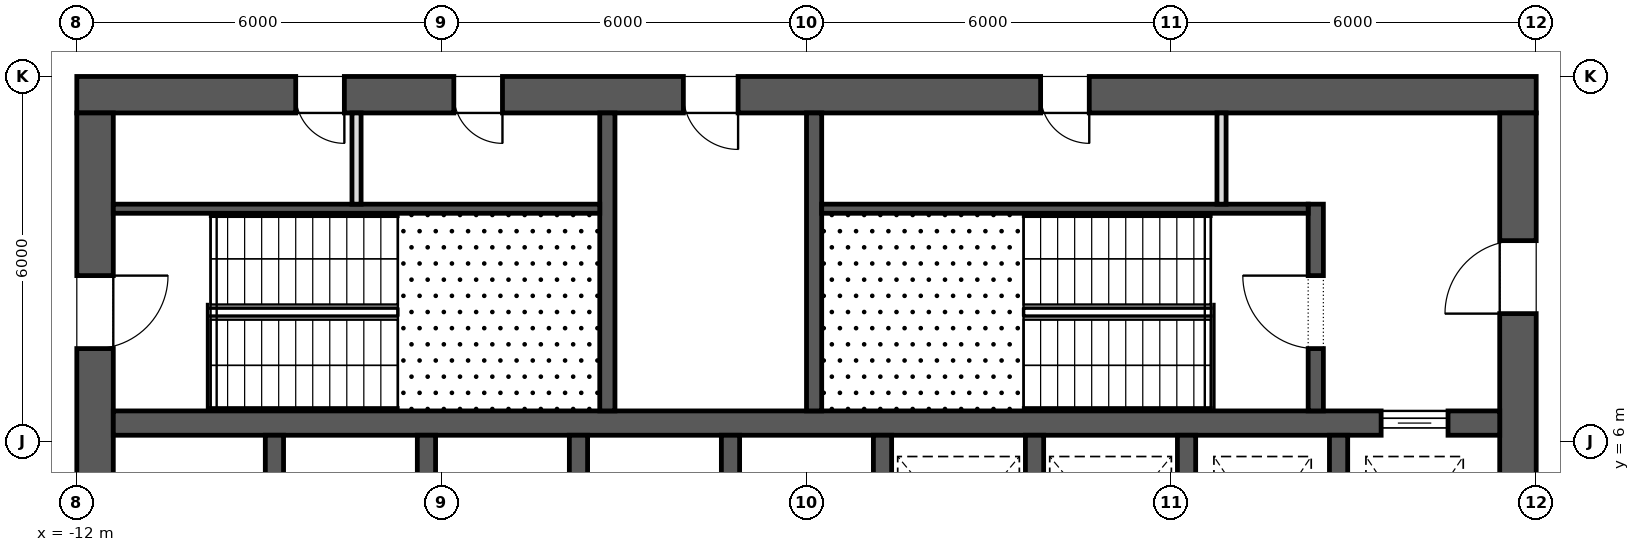
"""IFC4 building model, lengths in metres.
Left out: names, types, materials, properties, quantities, classifications, styles, units other than length and angle.
Written with IfcOpenShell. Run it as: python <this file> out.ifc"""

import sys

from ifc_helpers import new_model, si_unit, direction, frame, frame_2d, origin, place, context, subcontext, project, spatial, rectangle, extrude, element, fill, save


model = new_model("IFC4")
c1 = context("Model", 3, precision=1e-05, world=origin(), true_north=direction((0.0, 1.0)))
c2 = subcontext(c1, "Body", "Model", "MODEL_VIEW")
j1 = project(units=[si_unit("LENGTHUNIT", "METRE"), si_unit("PLANEANGLEUNIT", "RADIAN")], contexts=[c1])
p1 = place(None, origin())
s1 = spatial("IfcSite", under=j1, at=p1, CompositionType="ELEMENT")
p2 = place(p1, origin())
s2 = spatial("IfcBuilding", under=s1, at=p2, CompositionType="ELEMENT")
p3 = place(p2, frame((0.0, 0.0, 138.1)))
s3 = spatial("IfcBuildingStorey", under=s2, at=p3, CompositionType="ELEMENT", Elevation=138.1)
p4 = place(p3, frame((-12.0, 11.7, 0.0), z_axis=(0.0, 0.0, 1.0), x_axis=(1.0, 0.0, 0.0)))
e1 = element("IfcWall", 1, at=p4, inside=s3, PredefinedType="SHEAR", context=c2, shape_type="SweptSolid", body=[
    extrude(rectangle(XDim=24.0, YDim=0.6, at=frame_2d((12.0, 0.0))), origin(), (0.0, 0.0, 1.0), 4.2),
])
p5 = place(p4, frame((9.975, 0.0, 0.0)))
e2 = element("IfcOpeningElement", 2, at=p5, cuts=e1, PredefinedType="OPENING", context=c2, shape_type="SweptSolid", body=[
    extrude(rectangle(XDim=0.9, YDim=2.1, at=frame_2d((0.45, 1.05))), frame((0.0, 0.312, 0.0), z_axis=(0.0, -1.0, 0.0), x_axis=(1.0, 0.0, 0.0)), (0.0, 0.0, 1.0), 0.624),
])
p6 = place(p4, frame((3.6, 0.0, 0.0)))
e3 = element("IfcOpeningElement", 3, at=p6, cuts=e1, PredefinedType="OPENING", context=c2, shape_type="SweptSolid", body=[
    extrude(rectangle(XDim=0.8, YDim=2.1, at=frame_2d((0.4, 1.05))), frame((0.0, 0.312, 0.0), z_axis=(0.0, -1.0, 0.0), x_axis=(1.0, 0.0, 0.0)), (0.0, 0.0, 1.0), 0.624),
])
p7 = place(p4, frame((6.2, 0.0, 0.0)))
e4 = element("IfcOpeningElement", 4, at=p7, cuts=e1, PredefinedType="OPENING", context=c2, shape_type="SweptSolid", body=[
    extrude(rectangle(XDim=0.8, YDim=2.1, at=frame_2d((0.4, 1.05))), frame((0.0, 0.312, 0.0), z_axis=(0.0, -1.0, 0.0), x_axis=(1.0, 0.0, 0.0)), (0.0, 0.0, 1.0), 0.624),
])
p8 = place(p4, frame((15.85, 0.0, 0.0)))
e5 = element("IfcOpeningElement", 5, at=p8, cuts=e1, PredefinedType="OPENING", context=c2, shape_type="SweptSolid", body=[
    extrude(rectangle(XDim=0.8, YDim=2.1, at=frame_2d((0.4, 1.05))), frame((0.0, 0.312, 0.0), z_axis=(0.0, -1.0, 0.0), x_axis=(1.0, 0.0, 0.0)), (0.0, 0.0, 1.0), 0.624),
])
p9 = place(p3, frame((11.7, -11.4, 0.0), z_axis=(0.0, 0.0, 1.0), x_axis=(0.0, 1.0, 0.0)))
e6 = element("IfcWall", 6, at=p9, inside=s3, PredefinedType="SHEAR", context=c2, shape_type="SweptSolid", body=[
    extrude(rectangle(XDim=22.8, YDim=0.6, at=frame_2d((11.4, 0.0))), origin(), (0.0, 0.0, 1.0), 4.2),
])
p10 = place(p9, frame((10.2, 0.0, 0.0)))
e7 = element("IfcOpeningElement", 7, at=p10, cuts=e6, PredefinedType="OPENING", context=c2, shape_type="SweptSolid", body=[
    extrude(rectangle(XDim=2.4, YDim=2.1, at=frame_2d((1.2, 1.05))), frame((0.0, 0.312, 0.0), z_axis=(0.0, -1.0, 0.0), x_axis=(1.0, 0.0, 0.0)), (0.0, 0.0, 1.0), 0.624),
])
p11 = place(p9, frame((19.5, 0.0, 0.0)))
e8 = element("IfcOpeningElement", 8, at=p11, cuts=e6, PredefinedType="OPENING", context=c2, shape_type="SweptSolid", body=[
    extrude(rectangle(XDim=1.2, YDim=2.1, at=frame_2d((0.6, 1.05))), frame((0.0, 0.312, 0.0), z_axis=(0.0, -1.0, 0.0), x_axis=(1.0, 0.0, 0.0)), (0.0, 0.0, 1.0), 0.624),
])
p12 = place(p9, frame((2.1, 0.0, 0.0)))
e9 = element("IfcOpeningElement", 9, at=p12, cuts=e6, PredefinedType="OPENING", context=c2, shape_type="SweptSolid", body=[
    extrude(rectangle(XDim=1.2, YDim=2.1, at=frame_2d((0.6, 1.05))), frame((0.0, 0.312, 0.0), z_axis=(0.0, -1.0, 0.0), x_axis=(1.0, 0.0, 0.0)), (0.0, 0.0, 1.0), 0.624),
])
p13 = place(p3, frame((-11.7, -11.4, 0.0), z_axis=(0.0, 0.0, 1.0), x_axis=(0.0, 1.0, 0.0)))
e10 = element("IfcWall", 10, at=p13, inside=s3, PredefinedType="SHEAR", context=c2, shape_type="SweptSolid", body=[
    extrude(rectangle(XDim=22.8, YDim=0.6, at=frame_2d((11.4, 0.0))), origin(), (0.0, 0.0, 1.0), 4.2),
])
p14 = place(p13, frame((10.2, 0.0, 0.0)))
e11 = element("IfcOpeningElement", 11, at=p14, cuts=e10, PredefinedType="OPENING", context=c2, shape_type="SweptSolid", body=[
    extrude(rectangle(XDim=2.4, YDim=2.1, at=frame_2d((1.2, 1.05))), frame((0.0, 0.312, 0.0), z_axis=(0.0, -1.0, 0.0), x_axis=(1.0, 0.0, 0.0)), (0.0, 0.0, 1.0), 0.624),
])
p15 = place(p13, frame((18.925, 0.0, 0.0)))
e12 = element("IfcOpeningElement", 12, at=p15, cuts=e10, PredefinedType="OPENING", context=c2, shape_type="SweptSolid", body=[
    extrude(rectangle(XDim=1.2, YDim=2.1, at=frame_2d((0.6, 1.05))), frame((0.0, 0.312, 0.0), z_axis=(0.0, -1.0, 0.0), x_axis=(1.0, 0.0, 0.0)), (0.0, 0.0, 1.0), 0.624),
])
p16 = place(p13, frame((2.675, 0.0, 0.0)))
e13 = element("IfcOpeningElement", 13, at=p16, cuts=e10, PredefinedType="OPENING", context=c2, shape_type="SweptSolid", body=[
    extrude(rectangle(XDim=1.2, YDim=2.1, at=frame_2d((0.6, 1.05))), frame((0.0, 0.312, 0.0), z_axis=(0.0, -1.0, 0.0), x_axis=(1.0, 0.0, 0.0)), (0.0, 0.0, 1.0), 0.624),
])
p17 = place(p3, frame((-11.4, 6.3, 0.0), z_axis=(0.0, 0.0, 1.0), x_axis=(1.0, 0.0, 0.0)))
e14 = element("IfcWall", 14, at=p17, inside=s3, PredefinedType="SHEAR", context=c2, shape_type="SweptSolid", body=[
    extrude(rectangle(XDim=22.8, YDim=0.4, at=frame_2d((11.4, 0.0))), origin(), (0.0, 0.0, 1.0), 4.2),
])
p18 = place(p17, frame((20.85, 0.0, 0.0)))
e15 = element("IfcOpeningElement", 15, at=p18, cuts=e14, PredefinedType="OPENING", context=c2, shape_type="SweptSolid", body=[
    extrude(rectangle(XDim=1.1, YDim=2.1, at=frame_2d((0.55, 1.05))), frame((0.0, 0.212, 0.0), z_axis=(0.0, -1.0, 0.0), x_axis=(1.0, 0.0, 0.0)), (0.0, 0.0, 1.0), 0.424),
])
for number, where, z_axis, x_axis in (
    (16, (-8.75, 3.2, 0.0), (0.0, 0.0, 1.0), (0.0, 1.0, 0.0)),
    (17, (-6.25, 3.2, 0.0), (0.0, 0.0, 1.0), (0.0, 1.0, 0.0)),
    (18, (-3.75, 3.2, 0.0), (0.0, 0.0, 1.0), (0.0, 1.0, 0.0)),
    (19, (-1.25, 3.2, 0.0), (0.0, 0.0, 1.0), (0.0, 1.0, 0.0)),
    (20, (1.25, 3.2, 0.0), (0.0, 0.0, 1.0), (0.0, 1.0, 0.0)),
    (21, (3.75, 3.2, 0.0), (0.0, 0.0, 1.0), (0.0, 1.0, 0.0)),
    (22, (6.25, 3.2, 0.0), (0.0, 0.0, 1.0), (0.0, 1.0, 0.0)),
    (23, (8.75, 3.2, 0.0), (0.0, 0.0, 1.0), (0.0, 1.0, 0.0)),
):
    element("IfcWall", number, at=place(p3, frame(where, z_axis=z_axis, x_axis=x_axis)), inside=s3, PredefinedType="SHEAR", context=c2, shape_type="SweptSolid", body=[
        extrude(rectangle(XDim=2.9, YDim=0.3, at=frame_2d((1.45, 0.0))), origin(), (0.0, 0.0, 1.0), 4.2),
    ])
for number, where, z_axis, x_axis in (
    (24, (-3.275, 6.5, 0.0), (0.0, 0.0, 1.0), (0.0, 1.0, 0.0)),
    (25, (0.125, 6.5, 0.0), (0.0, 0.0, 1.0), (0.0, 1.0, 0.0)),
):
    element("IfcWall", number, at=place(p3, frame(where, z_axis=z_axis, x_axis=x_axis)), inside=s3, PredefinedType="SHEAR", context=c2, shape_type="SweptSolid", body=[
        extrude(rectangle(XDim=4.9, YDim=0.25, at=frame_2d((2.45, 0.0))), origin(), (0.0, 0.0, 1.0), 3.9),
    ])
p19 = place(p3, frame((8.375, 6.5, 0.0), z_axis=(0.0, 0.0, 1.0), x_axis=(0.0, 1.0, 0.0)))
e26 = element("IfcWall", 26, at=p19, inside=s3, PredefinedType="SHEAR", context=c2, shape_type="SweptSolid", body=[
    extrude(rectangle(XDim=3.4, YDim=0.25, at=frame_2d((1.7, 0.0))), origin(), (0.0, 0.0, 1.0), 3.9),
])
p20 = place(p19, frame((1.025, 0.0, 0.0)))
e27 = element("IfcOpeningElement", 27, at=p20, cuts=e26, PredefinedType="OPENING", context=c2, shape_type="SweptSolid", body=[
    extrude(rectangle(XDim=1.2, YDim=2.1, at=frame_2d((0.6, 1.05))), frame((0.0, 0.137, 0.0), z_axis=(0.0, -1.0, 0.0), x_axis=(1.0, 0.0, 0.0)), (0.0, 0.0, 1.0), 0.274),
])
for number, where, z_axis, x_axis in (
    (28, (-11.4, 9.825, 0.0), (0.0, 0.0, 1.0), (1.0, 0.0, 0.0)),
    (29, (0.25, 9.825, 0.0), (0.0, 0.0, 1.0), (1.0, 0.0, 0.0)),
):
    element("IfcWall", number, at=place(p3, frame(where, z_axis=z_axis, x_axis=x_axis)), inside=s3, PredefinedType="SHEAR", context=c2, shape_type="SweptSolid", body=[
        extrude(rectangle(XDim=8.0, YDim=0.15, at=frame_2d((4.0, 0.0))), origin(), (0.0, 0.0, 1.0), 3.9),
    ])
for number, where, z_axis, x_axis in (
    (30, (-7.4, 9.9, 0.0), (0.0, 0.0, 1.0), (0.0, 1.0, 0.0)),
    (31, (6.825, 9.9, 0.0), (0.0, 0.0, 1.0), (0.0, 1.0, 0.0)),
):
    element("IfcWall", number, at=place(p3, frame(where, z_axis=z_axis, x_axis=x_axis)), inside=s3, PredefinedType="PARTITIONING", context=c2, shape_type="SweptSolid", body=[
        extrude(rectangle(XDim=1.5, YDim=0.15, at=frame_2d((0.75, 0.0))), origin(), (0.0, 0.0, 1.0), 3.9),
    ])
p21 = place(p18, origin())
e32 = element("IfcDoor", 32, at=p21, inside=s3, OperationType="SLIDING_TO_LEFT", PredefinedType="DOOR", context=c2, shape_type="SweptSolid", body=[
    extrude(rectangle(XDim=1.1, YDim=2.1, at=frame_2d((0.55, 1.05))), frame((0.0, 0.025, 0.0), z_axis=(0.0, -1.0, 0.0), x_axis=(1.0, 0.0, 0.0)), (0.0, 0.0, 1.0), 0.05),
])
fill(e15, e32)
p22 = place(p15, frame((1.2, 0.0, 0.0), z_axis=(0.0, 0.0, 1.0), x_axis=(-1.0, 0.0, 0.0)))
e33 = element("IfcDoor", 33, at=p22, inside=s3, OperationType="SINGLE_SWING_RIGHT", PredefinedType="DOOR", context=c2, shape_type="SweptSolid", body=[
    extrude(rectangle(XDim=1.2, YDim=2.1, at=frame_2d((0.6, 1.05))), frame((0.0, 0.025, 0.0), z_axis=(0.0, -1.0, 0.0), x_axis=(1.0, 0.0, 0.0)), (0.0, 0.0, 1.0), 0.05),
])
fill(e12, e33)
p23 = place(p20, origin())
e34 = element("IfcDoor", 34, at=p23, inside=s3, OperationType="SINGLE_SWING_LEFT", PredefinedType="DOOR", context=c2, shape_type="SweptSolid", body=[
    extrude(rectangle(XDim=1.2, YDim=2.1, at=frame_2d((0.6, 1.05))), frame((0.0, 0.025, 0.0), z_axis=(0.0, -1.0, 0.0), x_axis=(1.0, 0.0, 0.0)), (0.0, 0.0, 1.0), 0.05),
])
fill(e27, e34)
p24 = place(p11, origin())
e35 = element("IfcDoor", 35, at=p24, inside=s3, OperationType="SINGLE_SWING_RIGHT", PredefinedType="DOOR", context=c2, shape_type="SweptSolid", body=[
    extrude(rectangle(XDim=1.2, YDim=2.1, at=frame_2d((0.6, 1.05))), frame((0.0, 0.025, 0.0), z_axis=(0.0, -1.0, 0.0), x_axis=(1.0, 0.0, 0.0)), (0.0, 0.0, 1.0), 0.05),
])
fill(e8, e35)
p25 = place(p5, frame((0.9, 0.0, 0.0), z_axis=(0.0, 0.0, 1.0), x_axis=(-1.0, 0.0, 0.0)))
e36 = element("IfcDoor", 36, at=p25, inside=s3, OperationType="SINGLE_SWING_RIGHT", PredefinedType="DOOR", context=c2, shape_type="SweptSolid", body=[
    extrude(rectangle(XDim=0.9, YDim=2.1, at=frame_2d((0.45, 1.05))), frame((0.0, 0.025, 0.0), z_axis=(0.0, -1.0, 0.0), x_axis=(1.0, 0.0, 0.0)), (0.0, 0.0, 1.0), 0.05),
])
fill(e2, e36)
p26 = place(p6, frame((0.8, 0.0, 0.0), z_axis=(0.0, 0.0, 1.0), x_axis=(-1.0, 0.0, 0.0)))
e37 = element("IfcDoor", 37, at=p26, inside=s3, OperationType="SINGLE_SWING_RIGHT", PredefinedType="DOOR", context=c2, shape_type="SweptSolid", body=[
    extrude(rectangle(XDim=0.8, YDim=2.1, at=frame_2d((0.4, 1.05))), frame((0.0, 0.025, 0.0), z_axis=(0.0, -1.0, 0.0), x_axis=(1.0, 0.0, 0.0)), (0.0, 0.0, 1.0), 0.05),
])
fill(e3, e37)
p27 = place(p7, frame((0.8, 0.0, 0.0), z_axis=(0.0, 0.0, 1.0), x_axis=(-1.0, 0.0, 0.0)))
e38 = element("IfcDoor", 38, at=p27, inside=s3, OperationType="SINGLE_SWING_RIGHT", PredefinedType="DOOR", context=c2, shape_type="SweptSolid", body=[
    extrude(rectangle(XDim=0.8, YDim=2.1, at=frame_2d((0.4, 1.05))), frame((0.0, 0.025, 0.0), z_axis=(0.0, -1.0, 0.0), x_axis=(1.0, 0.0, 0.0)), (0.0, 0.0, 1.0), 0.05),
])
fill(e4, e38)
p28 = place(p8, frame((0.8, 0.0, 0.0), z_axis=(0.0, 0.0, 1.0), x_axis=(-1.0, 0.0, 0.0)))
e39 = element("IfcDoor", 39, at=p28, inside=s3, OperationType="SINGLE_SWING_RIGHT", PredefinedType="DOOR", context=c2, shape_type="SweptSolid", body=[
    extrude(rectangle(XDim=0.8, YDim=2.1, at=frame_2d((0.4, 1.05))), frame((0.0, 0.025, 0.0), z_axis=(0.0, -1.0, 0.0), x_axis=(1.0, 0.0, 0.0)), (0.0, 0.0, 1.0), 0.05),
])
fill(e5, e39)
save(model, sys.argv[1])
